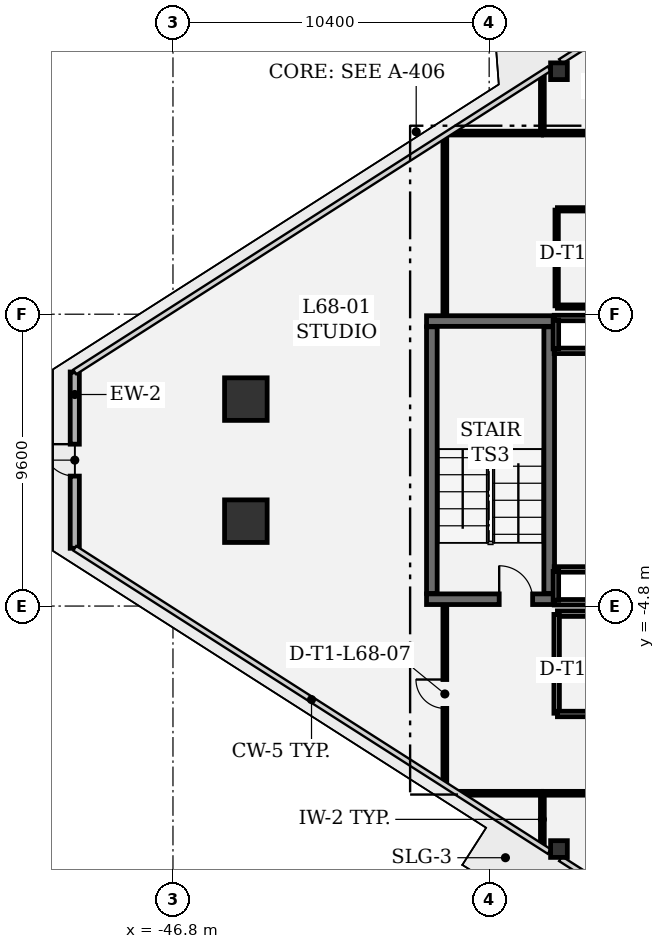
"""IFC4 building model, lengths in metres.
Left out: names, types, materials, properties, quantities, classifications, styles, units other than length and angle.
Written with IfcOpenShell. Run it as: python <this file> out.ifc"""

import sys

from ifc_helpers import new_model, si_unit, direction, frame, frame_2d, origin, origin_2d, place, context, subcontext, project, spatial, rectangle, extrude, element, fill, save


model = new_model("IFC4")
c1 = context("Model", 3, precision=1e-05, world=origin(), true_north=direction((0.0, 1.0)))
c2 = subcontext(c1, "Body", "Model", "MODEL_VIEW")
j1 = project(units=[si_unit("LENGTHUNIT", "METRE"), si_unit("PLANEANGLEUNIT", "RADIAN")], contexts=[c1])
p1 = place(None, origin())
s1 = spatial("IfcSite", under=j1, at=p1, CompositionType="ELEMENT")
p2 = place(p1, origin())
s2 = spatial("IfcBuilding", under=s1, at=p2, CompositionType="ELEMENT")
p3 = place(p2, frame((0.0, 0.0, 293.4)))
s3 = spatial("IfcBuildingStorey", under=s2, at=p3, CompositionType="ELEMENT", Elevation=293.4)
for number, where, z_axis, x_axis in (
    (1, (-44.403, 2.008, 0.0), (0.0, 0.0, 1.0), (1.0, 0.0, 0.0)),
    (2, (-44.403, -2.008, 0.0), (0.0, 0.0, 1.0), (1.0, 0.0, 0.0)),
):
    element("IfcColumn", number, at=place(p3, frame(where, z_axis=z_axis, x_axis=x_axis)), inside=s3, PredefinedType="COLUMN", context=c2, shape_type="SweptSolid", body=[
        extrude(rectangle(XDim=1.4, YDim=1.4, at=origin_2d()), origin(), (0.0, 0.0, 1.0), 4.2),
    ])
for number, where, z_axis, x_axis in (
    (3, (-34.104, 12.792, 0.0), (0.0, 0.0, 1.0), (1.0, 0.0, 0.0)),
    (4, (-34.104, -12.792, 0.0), (0.0, 0.0, 1.0), (1.0, 0.0, 0.0)),
):
    element("IfcColumn", number, at=place(p3, frame(where, z_axis=z_axis, x_axis=x_axis)), inside=s3, PredefinedType="COLUMN", context=c2, shape_type="SweptSolid", body=[
        extrude(rectangle(XDim=0.55, YDim=0.55, at=origin_2d()), origin(), (0.0, 0.0, 1.0), 4.2),
    ])
p4 = place(p3, frame((-50.03, -2.9, 0.0), z_axis=(0.0, 0.0, 1.0), x_axis=(0.0, 1.0, 0.0)))
e5 = element("IfcWall", 5, at=p4, inside=s3, PredefinedType="SOLIDWALL", context=c2, shape_type="SweptSolid", body=[
    extrude(rectangle(XDim=5.8, YDim=0.3, at=frame_2d((2.9, 0.0))), origin(), (0.0, 0.0, 1.0), 3.91),
])
p5 = place(p4, frame((2.375, 0.0, 0.0)))
e6 = element("IfcOpeningElement", 6, at=p5, cuts=e5, PredefinedType="OPENING", context=c2, shape_type="SweptSolid", body=[
    extrude(rectangle(XDim=1.05, YDim=2.2, at=frame_2d((0.525, 1.1))), frame((0.0, 0.16, 0.0), z_axis=(0.0, -1.0, 0.0), x_axis=(1.0, 0.0, 0.0)), (0.0, 0.0, 1.0), 0.32),
])
p6 = place(p3, frame((-38.46, -4.575, 0.0), z_axis=(0.0, 0.0, 1.0), x_axis=(1.0, 0.0, 0.0)))
e7 = element("IfcWall", 7, at=p6, inside=s3, PredefinedType="SHEAR", context=c2, shape_type="SweptSolid", body=[
    extrude(rectangle(XDim=4.21, YDim=0.35, at=frame_2d((2.105, 0.0))), origin(), (0.0, 0.0, 1.0), 3.91),
])
p7 = place(p6, frame((2.39, 0.0, 0.0)))
e8 = element("IfcOpeningElement", 8, at=p7, cuts=e7, PredefinedType="OPENING", context=c2, shape_type="SweptSolid", body=[
    extrude(rectangle(XDim=1.1, YDim=2.2, at=frame_2d((0.55, 1.1))), frame((0.0, 0.185, 0.0), z_axis=(0.0, -1.0, 0.0), x_axis=(1.0, 0.0, 0.0)), (0.0, 0.0, 1.0), 0.37),
])
p8 = place(p3, frame((-34.25, 4.575, 0.0), z_axis=(0.0, 0.0, 1.0), x_axis=(-1.0, 0.0, 0.0)))
e9 = element("IfcWall", 9, at=p8, inside=s3, PredefinedType="SHEAR", context=c2, shape_type="SweptSolid", body=[
    extrude(rectangle(XDim=4.21, YDim=0.35, at=frame_2d((2.105, 0.0))), origin(), (0.0, 0.0, 1.0), 3.91),
])
for number, where, z_axis, x_axis in (
    (10, (-34.425, -4.385, 0.0), (0.0, 0.0, 1.0), (0.0, 1.0, 0.0)),
    (11, (-38.285, 4.385, 0.0), (0.0, 0.0, 1.0), (0.0, -1.0, 0.0)),
):
    element("IfcWall", number, at=place(p3, frame(where, z_axis=z_axis, x_axis=x_axis)), inside=s3, PredefinedType="SHEAR", context=c2, shape_type="SweptSolid", body=[
        extrude(rectangle(XDim=8.77, YDim=0.35, at=frame_2d((4.385, 0.0))), origin(), (0.0, 0.0, 1.0), 3.91),
    ])
for number, where, z_axis, x_axis in (
    (12, (-32.99, 3.595, 0.0), (0.0, 0.0, 1.0), (-1.0, 0.0, 0.0)),
    (13, (-34.26, 4.675, 0.0), (0.0, 0.0, 1.0), (1.0, 0.0, 0.0)),
):
    element("IfcWall", number, at=place(p3, frame(where, z_axis=z_axis, x_axis=x_axis)), inside=s3, PredefinedType="PARTITIONING", context=c2, shape_type="SweptSolid", body=[
        extrude(rectangle(XDim=1.27, YDim=0.18, at=frame_2d((0.635, 0.0))), origin(), (0.0, 0.0, 1.0), 3.91),
    ])
p9 = place(p3, frame((-34.205, 3.66, 0.0), z_axis=(0.0, 0.0, 1.0), x_axis=(0.0, 1.0, 0.0)))
e14 = element("IfcWall", 14, at=p9, inside=s3, PredefinedType="PARTITIONING", context=c2, shape_type="SweptSolid", body=[
    extrude(rectangle(XDim=0.95, YDim=0.18, at=frame_2d((0.475, 0.0))), origin(), (0.0, 0.0, 1.0), 3.91),
])
for number, where, z_axis, x_axis in (
    (15, (-32.99, -4.675, 0.0), (0.0, 0.0, 1.0), (-1.0, 0.0, 0.0)),
    (16, (-34.26, -3.595, 0.0), (0.0, 0.0, 1.0), (1.0, 0.0, 0.0)),
):
    element("IfcWall", number, at=place(p3, frame(where, z_axis=z_axis, x_axis=x_axis)), inside=s3, PredefinedType="PARTITIONING", context=c2, shape_type="SweptSolid", body=[
        extrude(rectangle(XDim=1.27, YDim=0.18, at=frame_2d((0.635, 0.0))), origin(), (0.0, 0.0, 1.0), 3.91),
    ])
p10 = place(p3, frame((-34.205, -4.61, 0.0), z_axis=(0.0, 0.0, 1.0), x_axis=(0.0, 1.0, 0.0)))
e17 = element("IfcWall", 17, at=p10, inside=s3, PredefinedType="PARTITIONING", context=c2, shape_type="SweptSolid", body=[
    extrude(rectangle(XDim=0.95, YDim=0.18, at=frame_2d((0.475, 0.0))), origin(), (0.0, 0.0, 1.0), 3.91),
])
p11 = place(p3, frame((-34.18, 8.225, 0.0), z_axis=(0.0, 0.0, 1.0), x_axis=(0.0, -1.0, 0.0)))
e18 = element("IfcWall", 18, at=p11, inside=s3, PredefinedType="PARTITIONING", context=c2, shape_type="SweptSolid", body=[
    extrude(rectangle(XDim=3.15, YDim=0.11, at=frame_2d((1.575, 0.0))), origin(), (0.0, 0.0, 1.0), 3.91),
])
p12 = place(p3, frame((-34.155, 5.05, 0.0), z_axis=(0.0, 0.0, 1.0), x_axis=(1.0, 0.0, 0.0)))
e19 = element("IfcWall", 19, at=p12, inside=s3, PredefinedType="PARTITIONING", context=c2, shape_type="SweptSolid", body=[
    extrude(rectangle(XDim=3.19, YDim=0.11, at=frame_2d((1.595, 0.0))), origin(), (0.0, 0.0, 1.0), 3.91),
])
p13 = place(p3, frame((-28.413, 8.25, 0.0), z_axis=(0.0, 0.0, 1.0), x_axis=(-1.0, 0.0, 0.0)))
e20 = element("IfcWall", 20, at=p13, inside=s3, PredefinedType="PARTITIONING", context=c2, shape_type="SweptSolid", body=[
    extrude(rectangle(XDim=5.742, YDim=0.11, at=frame_2d((2.871, 0.0))), origin(), (0.0, 0.0, 1.0), 3.13),
])
p14 = place(p13, frame((2.431, 0.0, 0.0)))
e21 = element("IfcOpeningElement", 21, at=p14, cuts=e20, PredefinedType="OPENING", context=c2, shape_type="SweptSolid", body=[
    extrude(rectangle(XDim=0.88, YDim=2.1, at=frame_2d((0.44, 1.05))), frame((0.0, 0.065, 0.0), z_axis=(0.0, -1.0, 0.0), x_axis=(1.0, 0.0, 0.0)), (0.0, 0.0, 1.0), 0.13),
])
p15 = place(p3, frame((-30.965, -5.05, 0.0), z_axis=(0.0, 0.0, 1.0), x_axis=(-1.0, 0.0, 0.0)))
e22 = element("IfcWall", 22, at=p15, inside=s3, PredefinedType="PARTITIONING", context=c2, shape_type="SweptSolid", body=[
    extrude(rectangle(XDim=3.19, YDim=0.18, at=frame_2d((1.595, 0.0))), origin(), (0.0, 0.0, 1.0), 3.91),
])
p16 = place(p3, frame((-34.18, -5.075, 0.0), z_axis=(0.0, 0.0, 1.0), x_axis=(0.0, -1.0, 0.0)))
e23 = element("IfcWall", 23, at=p16, inside=s3, PredefinedType="PARTITIONING", context=c2, shape_type="SweptSolid", body=[
    extrude(rectangle(XDim=3.25, YDim=0.18, at=frame_2d((1.625, 0.0))), origin(), (0.0, 0.0, 1.0), 3.91),
])
p17 = place(p3, frame((-34.155, -8.35, 0.0), z_axis=(0.0, 0.0, 1.0), x_axis=(1.0, 0.0, 0.0)))
e24 = element("IfcWall", 24, at=p17, inside=s3, PredefinedType="PARTITIONING", context=c2, shape_type="SweptSolid", body=[
    extrude(rectangle(XDim=5.742, YDim=0.18, at=frame_2d((2.871, 0.0))), origin(), (0.0, 0.0, 1.0), 3.13),
])
p18 = place(p17, frame((2.431, 0.0, 0.0)))
e25 = element("IfcOpeningElement", 25, at=p18, cuts=e24, PredefinedType="OPENING", context=c2, shape_type="SweptSolid", body=[
    extrude(rectangle(XDim=0.88, YDim=2.1, at=frame_2d((0.44, 1.05))), frame((0.0, 0.1, 0.0), z_axis=(0.0, -1.0, 0.0), x_axis=(1.0, 0.0, 0.0)), (0.0, 0.0, 1.0), 0.2),
])
p19 = place(p3, frame((-34.65, -12.65, 0.0), z_axis=(0.0, 0.0, 1.0), x_axis=(0.0, 1.0, 0.0)))
e26 = element("IfcWall", 26, at=p19, inside=s3, PredefinedType="PARTITIONING", context=c2, shape_type="SweptSolid", body=[
    extrude(rectangle(XDim=1.667, YDim=0.125, at=frame_2d((0.833, 0.0))), origin(), (0.0, 0.0, 1.0), 3.91),
])
p20 = place(p3, frame((-37.343, -10.958, 0.0), z_axis=(0.0, 0.0, 1.0), x_axis=(1.0, 0.0, 0.0)))
e27 = element("IfcWall", 27, at=p20, inside=s3, PredefinedType="PARTITIONING", context=c2, shape_type="SweptSolid", body=[
    extrude(rectangle(XDim=2.668, YDim=0.125, at=frame_2d((1.334, 0.0))), origin(), (0.0, 0.0, 1.0), 3.91),
])
p21 = place(p3, frame((-37.858, -10.6, 0.0), z_axis=(0.0, 0.0, 1.0), x_axis=(0.0, 1.0, 0.0)))
e28 = element("IfcWall", 28, at=p21, inside=s3, PredefinedType="PARTITIONING", context=c2, shape_type="SweptSolid", body=[
    extrude(rectangle(XDim=5.817, YDim=0.125, at=frame_2d((2.908, 0.0))), origin(), (0.0, 0.0, 1.0), 3.91),
])
p22 = place(p21, frame((2.433, 0.0, 0.0)))
e29 = element("IfcOpeningElement", 29, at=p22, cuts=e28, PredefinedType="OPENING", context=c2, shape_type="SweptSolid", body=[
    extrude(rectangle(XDim=0.95, YDim=2.15, at=frame_2d((0.475, 1.075))), frame((0.0, 0.073, 0.0), z_axis=(0.0, -1.0, 0.0), x_axis=(1.0, 0.0, 0.0)), (0.0, 0.0, 1.0), 0.145),
])
p23 = place(p3, frame((-37.858, 4.783, 0.0), z_axis=(0.0, 0.0, 1.0), x_axis=(0.0, 1.0, 0.0)))
e30 = element("IfcWall", 30, at=p23, inside=s3, PredefinedType="PARTITIONING", context=c2, shape_type="SweptSolid", body=[
    extrude(rectangle(XDim=5.817, YDim=0.125, at=frame_2d((2.908, 0.0))), origin(), (0.0, 0.0, 1.0), 3.91),
])
p24 = place(p3, frame((-34.675, 10.758, 0.0), z_axis=(0.0, 0.0, 1.0), x_axis=(-1.0, 0.0, 0.0)))
e31 = element("IfcWall", 31, at=p24, inside=s3, PredefinedType="PARTITIONING", context=c2, shape_type="SweptSolid", body=[
    extrude(rectangle(XDim=2.98, YDim=0.125, at=frame_2d((1.49, 0.0))), origin(), (0.0, 0.0, 1.0), 3.91),
])
p25 = place(p3, frame((-34.65, 10.783, 0.0), z_axis=(0.0, 0.0, 1.0), x_axis=(0.0, 1.0, 0.0)))
e32 = element("IfcWall", 32, at=p25, inside=s3, PredefinedType="PARTITIONING", context=c2, shape_type="SweptSolid", body=[
    extrude(rectangle(XDim=1.867, YDim=0.125, at=frame_2d((0.934, 0.0))), origin(), (0.0, 0.0, 1.0), 3.91),
])
p26 = place(p3, frame((-34.617, 10.758, 0.0), z_axis=(0.0, 0.0, 1.0), x_axis=(1.0, 0.0, 0.0)))
e33 = element("IfcWall", 33, at=p26, inside=s3, PredefinedType="PARTITIONING", context=c2, shape_type="SweptSolid", body=[
    extrude(rectangle(XDim=5.409, YDim=0.125, at=frame_2d((2.705, 0.0))), origin(), (0.0, 0.0, 1.0), 3.13),
])
p27 = place(p26, frame((2.229, 0.0, 0.0)))
e34 = element("IfcOpeningElement", 34, at=p27, cuts=e33, PredefinedType="OPENING", context=c2, shape_type="SweptSolid", body=[
    extrude(rectangle(XDim=0.95, YDim=2.15, at=frame_2d((0.475, 1.075))), frame((0.0, 0.073, 0.0), z_axis=(0.0, -1.0, 0.0), x_axis=(1.0, 0.0, 0.0)), (0.0, 0.0, 1.0), 0.145),
])
p28 = place(p3, frame((-29.942, -10.958, 0.0), z_axis=(0.0, 0.0, 1.0), x_axis=(-1.0, 0.0, 0.0)))
e35 = element("IfcWall", 35, at=p28, inside=s3, PredefinedType="PARTITIONING", context=c2, shape_type="SweptSolid", body=[
    extrude(rectangle(XDim=4.676, YDim=0.125, at=frame_2d((2.338, 0.0))), origin(), (0.0, 0.0, 1.0), 3.13),
])
p29 = place(p28, frame((1.863, 0.0, 0.0)))
e36 = element("IfcOpeningElement", 36, at=p29, cuts=e35, PredefinedType="OPENING", context=c2, shape_type="SweptSolid", body=[
    extrude(rectangle(XDim=0.95, YDim=2.15, at=frame_2d((0.475, 1.075))), frame((0.0, 0.073, 0.0), z_axis=(0.0, -1.0, 0.0), x_axis=(1.0, 0.0, 0.0)), (0.0, 0.0, 1.0), 0.145),
])
p30 = place(p5, origin())
e37 = element("IfcDoor", 37, at=p30, inside=s3, OperationType="SINGLE_SWING_RIGHT", PredefinedType="DOOR", context=c2, shape_type="SweptSolid", body=[
    extrude(rectangle(XDim=1.05, YDim=2.2, at=frame_2d((0.525, 1.1))), frame((0.0, 0.025, 0.0), z_axis=(0.0, -1.0, 0.0), x_axis=(1.0, 0.0, 0.0)), (0.0, 0.0, 1.0), 0.05),
])
fill(e6, e37)
p31 = place(p7, origin())
e38 = element("IfcDoor", 38, at=p31, inside=s3, OperationType="SINGLE_SWING_LEFT", PredefinedType="DOOR", context=c2, shape_type="SweptSolid", body=[
    extrude(rectangle(XDim=1.1, YDim=2.2, at=frame_2d((0.55, 1.1))), frame((0.0, 0.025, 0.0), z_axis=(0.0, -1.0, 0.0), x_axis=(1.0, 0.0, 0.0)), (0.0, 0.0, 1.0), 0.05),
])
fill(e8, e38)
p32 = place(p22, origin())
e39 = element("IfcDoor", 39, at=p32, inside=s3, OperationType="SINGLE_SWING_RIGHT", PredefinedType="DOOR", context=c2, shape_type="SweptSolid", body=[
    extrude(rectangle(XDim=0.95, YDim=2.15, at=frame_2d((0.475, 1.075))), frame((0.0, 0.025, 0.0), z_axis=(0.0, -1.0, 0.0), x_axis=(1.0, 0.0, 0.0)), (0.0, 0.0, 1.0), 0.05),
])
fill(e29, e39)
save(model, sys.argv[1])
